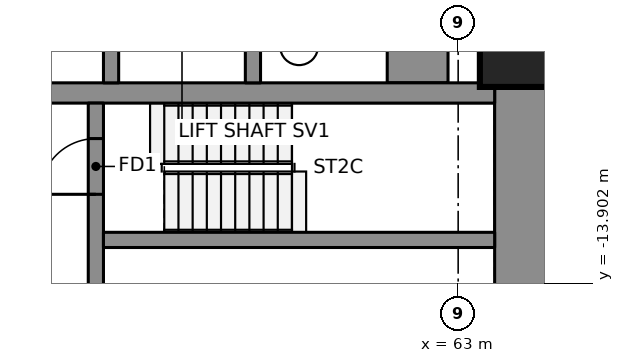
"""IFC4 building model, lengths in metres.
Left out: names, types, materials, properties, quantities, classifications, styles, units other than length and angle.
Written with IfcOpenShell. Run it as: python <this file> out.ifc"""

import sys

from ifc_helpers import new_model, si_unit, direction, frame, frame_2d, origin, origin_2d, place, context, subcontext, project, spatial, rectangle, extrude, element, fill, save


model = new_model("IFC4")
c1 = context("Model", 3, precision=1e-05, world=origin(), true_north=direction((0.0, 1.0)))
c2 = subcontext(c1, "Body", "Model", "MODEL_VIEW")
j1 = project(units=[si_unit("LENGTHUNIT", "METRE"), si_unit("PLANEANGLEUNIT", "RADIAN")], contexts=[c1])
p1 = place(None, origin())
s1 = spatial("IfcSite", under=j1, at=p1, CompositionType="ELEMENT")
p2 = place(p1, origin())
s2 = spatial("IfcBuilding", under=s1, at=p2, CompositionType="ELEMENT")
p3 = place(p2, frame((0.0, 0.0, 57.35)))
s3 = spatial("IfcBuildingStorey", under=s2, at=p3, CompositionType="ELEMENT", Elevation=57.35)
p4 = place(p3, frame((64.32, -15.75, 0.0), z_axis=(0.0, 0.0, 1.0), x_axis=(0.0, 1.0, 0.0)))
e1 = element("IfcWall", 1, at=p4, inside=s3, PredefinedType="SHEAR", context=c2, shape_type="SweptSolid", body=[
    extrude(rectangle(XDim=5.8, YDim=1.2, at=frame_2d((2.9, 0.0))), origin(), (0.0, 0.0, 1.0), 3.55),
])
p5 = place(p3, frame((62.2, -9.95, 0.0), z_axis=(0.0, 0.0, 1.0), x_axis=(0.0, 1.0, 0.0)))
e2 = element("IfcWall", 2, at=p5, inside=s3, PredefinedType="SHEAR", context=c2, shape_type="SweptSolid", body=[
    extrude(rectangle(XDim=19.9, YDim=1.2, at=frame_2d((9.95, 0.0))), origin(), (0.0, 0.0, 1.0), 3.55),
])
p6 = place(p3, frame((50.7, -10.15, 0.0), z_axis=(0.0, 0.0, 1.0), x_axis=(1.0, 0.0, 0.0)))
e3 = element("IfcWall", 3, at=p6, inside=s3, PredefinedType="SHEAR", context=c2, shape_type="SweptSolid", body=[
    extrude(rectangle(XDim=13.02, YDim=0.4, at=frame_2d((6.51, 0.0))), origin(), (0.0, 0.0, 1.0), 3.55),
])
for number, where, z_axis, x_axis in (
    (4, (56.15, -9.95, 0.0), (0.0, 0.0, 1.0), (0.0, 1.0, 0.0)),
    (5, (58.95, -9.95, 0.0), (0.0, 0.0, 1.0), (0.0, 1.0, 0.0)),
):
    element("IfcWall", number, at=place(p3, frame(where, z_axis=z_axis, x_axis=x_axis)), inside=s3, PredefinedType="SHEAR", context=c2, shape_type="SweptSolid", body=[
        extrude(rectangle(XDim=3.0, YDim=0.3, at=frame_2d((1.5, 0.0))), origin(), (0.0, 0.0, 1.0), 3.55),
    ])
p7 = place(p3, frame((55.85, -15.75, 0.0), z_axis=(0.0, 0.0, 1.0), x_axis=(0.0, 1.0, 0.0)))
e6 = element("IfcWall", 6, at=p7, inside=s3, PredefinedType="SHEAR", context=c2, shape_type="SweptSolid", body=[
    extrude(rectangle(XDim=5.4, YDim=0.3, at=frame_2d((2.7, 0.0))), origin(), (0.0, 0.0, 1.0), 3.55),
])
p8 = place(p7, frame((3.6, 0.0, 0.0)))
e7 = element("IfcOpeningElement", 7, at=p8, cuts=e6, PredefinedType="OPENING", context=c2, shape_type="SweptSolid", body=[
    extrude(rectangle(XDim=1.1, YDim=2.1, at=frame_2d((0.55, 1.05))), frame((0.0, 0.16, 0.0), z_axis=(0.0, -1.0, 0.0), x_axis=(1.0, 0.0, 0.0)), (0.0, 0.0, 1.0), 0.32),
])
p9 = place(p7, frame((0.8, 0.0, 0.0)))
e8 = element("IfcOpeningElement", 8, at=p9, cuts=e6, PredefinedType="OPENING", context=c2, shape_type="SweptSolid", body=[
    extrude(rectangle(XDim=0.9, YDim=2.1, at=frame_2d((0.45, 1.05))), frame((0.0, 0.16, 0.0), z_axis=(0.0, -1.0, 0.0), x_axis=(1.0, 0.0, 0.0)), (0.0, 0.0, 1.0), 0.32),
])
p10 = place(p3, frame((56.0, -13.05, 0.0), z_axis=(0.0, 0.0, 1.0), x_axis=(1.0, 0.0, 0.0)))
e9 = element("IfcWall", 9, at=p10, inside=s3, PredefinedType="SHEAR", context=c2, shape_type="SweptSolid", body=[
    extrude(rectangle(XDim=7.72, YDim=0.3, at=frame_2d((3.86, 0.0))), origin(), (0.0, 0.0, 1.0), 3.55),
])
p11 = place(p3, frame((64.328, -9.131, 0.0), z_axis=(0.0, 0.0, 1.0), x_axis=(1.0, 0.0, 0.0)))
e10 = element("IfcColumn", 10, at=p11, inside=s3, PredefinedType="COLUMN", context=c2, shape_type="SweptSolid", body=[
    extrude(rectangle(XDim=1.8, YDim=1.8, at=origin_2d()), origin(), (0.0, 0.0, 1.0), 3.55),
])
p12 = place(p8, origin())
e11 = element("IfcDoor", 11, at=p12, inside=s3, OperationType="SINGLE_SWING_RIGHT", PredefinedType="DOOR", context=c2, shape_type="SweptSolid", body=[
    extrude(rectangle(XDim=1.1, YDim=2.1, at=frame_2d((0.55, 1.05))), frame((0.0, 0.025, 0.0), z_axis=(0.0, -1.0, 0.0), x_axis=(1.0, 0.0, 0.0)), (0.0, 0.0, 1.0), 0.05),
])
fill(e7, e11)
save(model, sys.argv[1])
